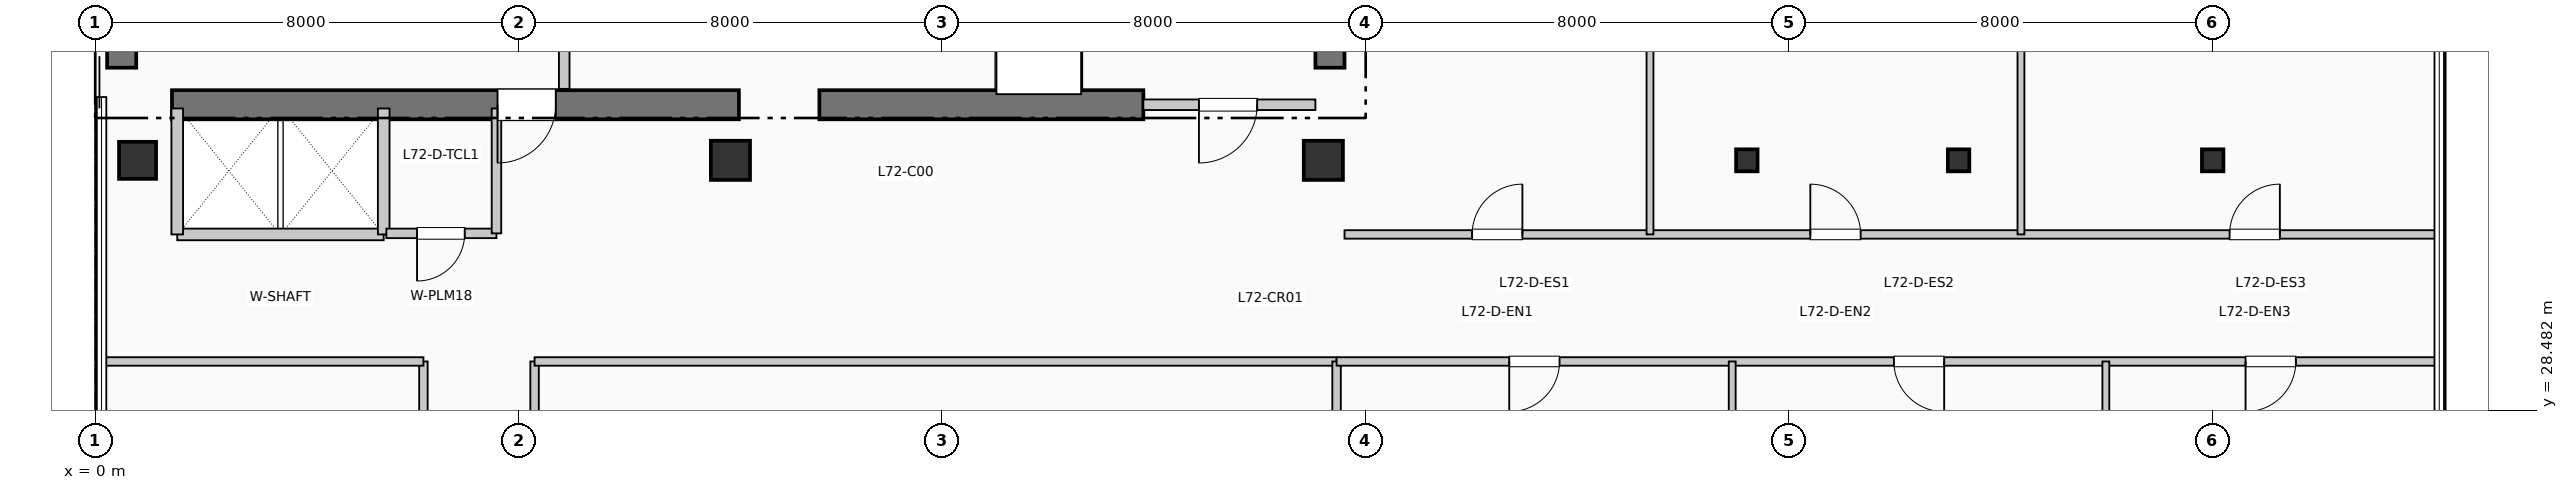
"""IFC4 building model, lengths in metres.
Left out: names, types, materials, properties, quantities, classifications, styles, units other than length and angle.
Written with IfcOpenShell. Run it as: python <this file> out.ifc"""

import sys

from ifc_helpers import new_model, si_unit, direction, frame, frame_2d, origin, origin_2d, place, context, subcontext, project, spatial, rectangle, i_section, extrude, element, fill, save


model = new_model("IFC4")
c1 = context("Model", 3, precision=1e-05, world=origin(), true_north=direction((0.0, 1.0)))
c2 = subcontext(c1, "Body", "Model", "MODEL_VIEW")
j1 = project(units=[si_unit("LENGTHUNIT", "METRE"), si_unit("PLANEANGLEUNIT", "RADIAN")], contexts=[c1])
p1 = place(None, origin())
s1 = spatial("IfcSite", under=j1, at=p1, CompositionType="ELEMENT")
p2 = place(p1, origin())
s2 = spatial("IfcBuilding", under=s1, at=p2, CompositionType="ELEMENT")
p3 = place(p2, frame((0.0, 0.0, 296.01)))
s3 = spatial("IfcBuildingStorey", under=s2, at=p3, CompositionType="ELEMENT", Elevation=296.01)
p4 = place(p3, frame((0.5, 34.95, 0.0), z_axis=(0.0, 0.0, 1.0), x_axis=(0.0, 1.0, 0.0)))
e1 = element("IfcWall", 1, at=p4, inside=s3, PredefinedType="SHEAR", context=c2, shape_type="SweptSolid", body=[
    extrude(rectangle(XDim=7.9, YDim=0.55, at=frame_2d((3.95, 0.0))), origin(), (0.0, 0.0, 1.0), 3.96),
])
p5 = place(p3, frame((23.325, 34.95, 0.0), z_axis=(0.0, 0.0, 1.0), x_axis=(0.0, 1.0, 0.0)))
e2 = element("IfcWall", 2, at=p5, inside=s3, PredefinedType="SHEAR", context=c2, shape_type="SweptSolid", body=[
    extrude(rectangle(XDim=10.64, YDim=0.55, at=frame_2d((5.32, 0.0))), origin(), (0.0, 0.0, 1.0), 3.96),
])
p6 = place(p3, frame((1.45, 34.25, 0.0), z_axis=(0.0, 0.0, 1.0), x_axis=(1.0, 0.0, 0.0)))
e3 = element("IfcWall", 3, at=p6, inside=s3, PredefinedType="SHEAR", context=c2, shape_type="SweptSolid", body=[
    extrude(rectangle(XDim=10.71, YDim=0.55, at=frame_2d((5.355, 0.0))), origin(), (0.0, 0.0, 1.0), 3.96),
])
p7 = place(p6, frame((7.25, 0.0, 0.0), z_axis=(0.0, 0.0, 1.0), x_axis=(-1.0, 0.0, 0.0)))
e4 = element("IfcOpeningElement", 4, at=p7, cuts=e3, PredefinedType="OPENING", context=c2, shape_type="SweptSolid", body=[
    extrude(rectangle(XDim=1.1, YDim=2.15, at=frame_2d((0.55, 1.075))), frame((0.0, 0.285, 0.0), z_axis=(0.0, -1.0, 0.0), x_axis=(1.0, 0.0, 0.0)), (0.0, 0.0, 1.0), 0.57),
])
p8 = place(p3, frame((13.68, 34.25, 0.0), z_axis=(0.0, 0.0, 1.0), x_axis=(1.0, 0.0, 0.0)))
e5 = element("IfcWall", 5, at=p8, inside=s3, PredefinedType="SHEAR", context=c2, shape_type="SweptSolid", body=[
    extrude(rectangle(XDim=6.12, YDim=0.55, at=frame_2d((3.06, 0.0))), origin(), (0.0, 0.0, 1.0), 3.96),
])
p9 = place(p3, frame((0.8, 33.2, 0.0), z_axis=(0.0, 0.0, 1.0), x_axis=(1.0, 0.0, 0.0)))
e6 = element("IfcColumn", 6, at=p9, inside=s3, PredefinedType="COLUMN", context=c2, shape_type="SweptSolid", body=[
    extrude(rectangle(XDim=0.7, YDim=0.7, at=origin_2d()), origin(), (0.0, 0.0, 1.0), 3.96),
])
for number, where, z_axis, x_axis in (
    (7, (12.0, 33.2, 0.0), (0.0, 0.0, 1.0), (1.0, 0.0, 0.0)),
    (8, (23.2, 33.2, 0.0), (0.0, 0.0, 1.0), (1.0, 0.0, 0.0)),
):
    element("IfcColumn", number, at=place(p3, frame(where, z_axis=z_axis, x_axis=x_axis)), inside=s3, PredefinedType="COLUMN", context=c2, shape_type="SweptSolid", body=[
        extrude(rectangle(XDim=0.74, YDim=0.74, at=origin_2d()), origin(), (0.0, 0.0, 1.0), 3.96),
    ])
for number, where, z_axis, x_axis in (
    (9, (31.2, 33.2, 0.0), (0.0, 0.0, 1.0), (1.0, 0.0, 0.0)),
    (10, (35.2, 33.2, 0.0), (0.0, 0.0, 1.0), (1.0, 0.0, 0.0)),
    (11, (40.0, 33.2, 0.0), (0.0, 0.0, 1.0), (1.0, 0.0, 0.0)),
):
    element("IfcColumn", number, at=place(p3, frame(where, z_axis=z_axis, x_axis=x_axis)), inside=s3, PredefinedType="COLUMN", context=c2, shape_type="SweptSolid", body=[
        extrude(i_section(OverallWidth=0.406, OverallDepth=0.416, WebThickness=0.022, FlangeThickness=0.036, at=origin_2d()), origin(), (0.0, 0.0, 1.0), 3.96),
    ])
p10 = place(p3, frame((8.86, 34.55, 0.0), z_axis=(0.0, 0.0, 1.0), x_axis=(0.0, 1.0, 0.0)))
e12 = element("IfcWall", 12, at=p10, inside=s3, PredefinedType="PARTITIONING", context=c2, shape_type="SweptSolid", body=[
    extrude(rectangle(XDim=2.5, YDim=0.2, at=frame_2d((1.25, 0.0))), origin(), (0.0, 0.0, 1.0), 3.74),
])
p11 = place(p3, frame((19.8, 34.25, 0.0), z_axis=(0.0, 0.0, 1.0), x_axis=(1.0, 0.0, 0.0)))
e13 = element("IfcWall", 13, at=p11, inside=s3, PredefinedType="PARTITIONING", context=c2, shape_type="SweptSolid", body=[
    extrude(rectangle(XDim=3.25, YDim=0.2, at=frame_2d((1.625, 0.0))), origin(), (0.0, 0.0, 1.0), 3.74),
])
p12 = place(p11, frame((2.15, 0.0, 0.0), z_axis=(0.0, 0.0, 1.0), x_axis=(-1.0, 0.0, 0.0)))
e14 = element("IfcOpeningElement", 14, at=p12, cuts=e13, PredefinedType="OPENING", context=c2, shape_type="SweptSolid", body=[
    extrude(rectangle(XDim=1.1, YDim=2.15, at=frame_2d((0.55, 1.075))), frame((0.0, 0.11, 0.0), z_axis=(0.0, -1.0, 0.0), x_axis=(1.0, 0.0, 0.0)), (0.0, 0.0, 1.0), 0.22),
])
p13 = place(p3, frame((1.55, 31.8, 0.0), z_axis=(0.0, 0.0, 1.0), x_axis=(1.0, 0.0, 0.0)))
e15 = element("IfcWall", 15, at=p13, inside=s3, PredefinedType="PARTITIONING", context=c2, shape_type="SweptSolid", body=[
    extrude(rectangle(XDim=3.9, YDim=0.22, at=frame_2d((1.95, 0.0))), origin(), (0.0, 0.0, 1.0), 3.74),
])
for number, where, z_axis, x_axis in (
    (16, (1.55, 31.8, 0.0), (0.0, 0.0, 1.0), (0.0, 1.0, 0.0)),
    (17, (5.45, 31.8, 0.0), (0.0, 0.0, 1.0), (0.0, 1.0, 0.0)),
):
    element("IfcWall", number, at=place(p3, frame(where, z_axis=z_axis, x_axis=x_axis)), inside=s3, PredefinedType="PARTITIONING", context=c2, shape_type="SweptSolid", body=[
        extrude(rectangle(XDim=2.38, YDim=0.22, at=frame_2d((1.19, 0.0))), origin(), (0.0, 0.0, 1.0), 3.74),
    ])
p14 = place(p3, frame((5.5, 31.82, 0.0), z_axis=(0.0, 0.0, 1.0), x_axis=(1.0, 0.0, 0.0)))
e18 = element("IfcWall", 18, at=p14, inside=s3, PredefinedType="PLUMBINGWALL", context=c2, shape_type="SweptSolid", body=[
    extrude(rectangle(XDim=2.08, YDim=0.18, at=frame_2d((1.04, 0.0))), origin(), (0.0, 0.0, 1.0), 3.74),
])
p15 = place(p14, frame((1.48, 0.0, 0.0), z_axis=(0.0, 0.0, 1.0), x_axis=(-1.0, 0.0, 0.0)))
e19 = element("IfcOpeningElement", 19, at=p15, cuts=e18, PredefinedType="OPENING", context=c2, shape_type="SweptSolid", body=[
    extrude(rectangle(XDim=0.9, YDim=2.1, at=frame_2d((0.45, 1.05))), frame((0.0, 0.1, 0.0), z_axis=(0.0, -1.0, 0.0), x_axis=(1.0, 0.0, 0.0)), (0.0, 0.0, 1.0), 0.2),
])
p16 = place(p3, frame((7.58, 31.82, 0.0), z_axis=(0.0, 0.0, 1.0), x_axis=(0.0, 1.0, 0.0)))
e20 = element("IfcWall", 20, at=p16, inside=s3, PredefinedType="PLUMBINGWALL", context=c2, shape_type="SweptSolid", body=[
    extrude(rectangle(XDim=2.36, YDim=0.18, at=frame_2d((1.18, 0.0))), origin(), (0.0, 0.0, 1.0), 3.74),
])
p17 = place(p3, frame((6.2, 11.04, 0.0), z_axis=(0.0, 0.0, 1.0), x_axis=(0.0, 1.0, 0.0)))
e21 = element("IfcWall", 21, at=p17, inside=s3, PredefinedType="PARTITIONING", context=c2, shape_type="SweptSolid", body=[
    extrude(rectangle(XDim=18.36, YDim=0.16, at=frame_2d((9.18, 0.0))), origin(), (0.0, 0.0, 1.0), 3.74),
])
p18 = place(p17, frame((3.413, 0.0, 0.0), z_axis=(0.0, 0.0, 1.0), x_axis=(-1.0, 0.0, 0.0)))
e22 = element("IfcOpeningElement", 22, at=p18, cuts=e21, PredefinedType="OPENING", context=c2, shape_type="SweptSolid", body=[
    extrude(rectangle(XDim=0.95, YDim=2.15, at=frame_2d((0.475, 1.075))), frame((0.0, 0.09, 0.0), z_axis=(0.0, -1.0, 0.0), x_axis=(1.0, 0.0, 0.0)), (0.0, 0.0, 1.0), 0.18),
])
p19 = place(p17, frame((9.38, 0.0, 0.0), z_axis=(0.0, 0.0, 1.0), x_axis=(-1.0, 0.0, 0.0)))
e23 = element("IfcOpeningElement", 23, at=p19, cuts=e21, PredefinedType="OPENING", context=c2, shape_type="SweptSolid", body=[
    extrude(rectangle(XDim=0.95, YDim=2.15, at=frame_2d((0.475, 1.075))), frame((0.0, 0.09, 0.0), z_axis=(0.0, -1.0, 0.0), x_axis=(1.0, 0.0, 0.0)), (0.0, 0.0, 1.0), 0.18),
])
p20 = place(p17, frame((15.622, 0.0, 0.0), z_axis=(0.0, 0.0, 1.0), x_axis=(-1.0, 0.0, 0.0)))
e24 = element("IfcOpeningElement", 24, at=p20, cuts=e21, PredefinedType="OPENING", context=c2, shape_type="SweptSolid", body=[
    extrude(rectangle(XDim=0.95, YDim=2.15, at=frame_2d((0.475, 1.075))), frame((0.0, 0.09, 0.0), z_axis=(0.0, -1.0, 0.0), x_axis=(1.0, 0.0, 0.0)), (0.0, 0.0, 1.0), 0.18),
])
p21 = place(p3, frame((8.3, 11.04, 0.0), z_axis=(0.0, 0.0, 1.0), x_axis=(0.0, 1.0, 0.0)))
e25 = element("IfcWall", 25, at=p21, inside=s3, PredefinedType="PARTITIONING", context=c2, shape_type="SweptSolid", body=[
    extrude(rectangle(XDim=18.36, YDim=0.16, at=frame_2d((9.18, 0.0))), origin(), (0.0, 0.0, 1.0), 3.74),
])
p22 = place(p21, frame((1.545, 0.0, 0.0)))
e26 = element("IfcOpeningElement", 26, at=p22, cuts=e25, PredefinedType="OPENING", context=c2, shape_type="SweptSolid", body=[
    extrude(rectangle(XDim=0.95, YDim=2.15, at=frame_2d((0.475, 1.075))), frame((0.0, 0.09, 0.0), z_axis=(0.0, -1.0, 0.0), x_axis=(1.0, 0.0, 0.0)), (0.0, 0.0, 1.0), 0.18),
])
p23 = place(p21, frame((5.951, 0.0, 0.0)))
e27 = element("IfcOpeningElement", 27, at=p23, cuts=e25, PredefinedType="OPENING", context=c2, shape_type="SweptSolid", body=[
    extrude(rectangle(XDim=0.95, YDim=2.15, at=frame_2d((0.475, 1.075))), frame((0.0, 0.09, 0.0), z_axis=(0.0, -1.0, 0.0), x_axis=(1.0, 0.0, 0.0)), (0.0, 0.0, 1.0), 0.18),
])
p24 = place(p21, frame((10.908, 0.0, 0.0)))
e28 = element("IfcOpeningElement", 28, at=p24, cuts=e25, PredefinedType="OPENING", context=c2, shape_type="SweptSolid", body=[
    extrude(rectangle(XDim=0.95, YDim=2.15, at=frame_2d((0.475, 1.075))), frame((0.0, 0.09, 0.0), z_axis=(0.0, -1.0, 0.0), x_axis=(1.0, 0.0, 0.0)), (0.0, 0.0, 1.0), 0.18),
])
p25 = place(p21, frame((15.682, 0.0, 0.0)))
e29 = element("IfcOpeningElement", 29, at=p25, cuts=e25, PredefinedType="OPENING", context=c2, shape_type="SweptSolid", body=[
    extrude(rectangle(XDim=0.95, YDim=2.15, at=frame_2d((0.475, 1.075))), frame((0.0, 0.09, 0.0), z_axis=(0.0, -1.0, 0.0), x_axis=(1.0, 0.0, 0.0)), (0.0, 0.0, 1.0), 0.18),
])
p26 = place(p3, frame((0.19, 29.4, 0.0), z_axis=(0.0, 0.0, 1.0), x_axis=(1.0, 0.0, 0.0)))
e30 = element("IfcWall", 30, at=p26, inside=s3, PredefinedType="PARTITIONING", context=c2, shape_type="SweptSolid", body=[
    extrude(rectangle(XDim=6.01, YDim=0.16, at=frame_2d((3.005, 0.0))), origin(), (0.0, 0.0, 1.0), 3.425),
])
p27 = place(p3, frame((8.3, 29.4, 0.0), z_axis=(0.0, 0.0, 1.0), x_axis=(1.0, 0.0, 0.0)))
e31 = element("IfcWall", 31, at=p27, inside=s3, PredefinedType="PARTITIONING", context=c2, shape_type="SweptSolid", body=[
    extrude(rectangle(XDim=15.15, YDim=0.16, at=frame_2d((7.575, 0.0))), origin(), (0.0, 0.0, 1.0), 3.425),
])
p28 = place(p3, frame((23.45, 6.84, 0.0), z_axis=(0.0, 0.0, 1.0), x_axis=(0.0, 1.0, 0.0)))
e32 = element("IfcWall", 32, at=p28, inside=s3, PredefinedType="PARTITIONING", context=c2, shape_type="SweptSolid", body=[
    extrude(rectangle(XDim=22.56, YDim=0.16, at=frame_2d((11.28, 0.0))), origin(), (0.0, 0.0, 1.0), 3.175),
])
p29 = place(p3, frame((23.45, 29.4, 0.0), z_axis=(0.0, 0.0, 1.0), x_axis=(1.0, 0.0, 0.0)))
e33 = element("IfcWall", 33, at=p29, inside=s3, PredefinedType="PARTITIONING", context=c2, shape_type="SweptSolid", body=[
    extrude(rectangle(XDim=20.76, YDim=0.16, at=frame_2d((10.38, 0.0))), origin(), (0.0, 0.0, 1.0), 3.425),
])
p30 = place(p29, frame((4.212, 0.0, 0.0), z_axis=(0.0, 0.0, 1.0), x_axis=(-1.0, 0.0, 0.0)))
e34 = element("IfcOpeningElement", 34, at=p30, cuts=e33, PredefinedType="OPENING", context=c2, shape_type="SweptSolid", body=[
    extrude(rectangle(XDim=0.95, YDim=2.15, at=frame_2d((0.475, 1.075))), frame((0.0, 0.09, 0.0), z_axis=(0.0, -1.0, 0.0), x_axis=(1.0, 0.0, 0.0)), (0.0, 0.0, 1.0), 0.18),
])
p31 = place(p29, frame((11.478, 0.0, 0.0), z_axis=(0.0, 0.0, 1.0), x_axis=(-1.0, 0.0, 0.0)))
e35 = element("IfcOpeningElement", 35, at=p31, cuts=e33, PredefinedType="OPENING", context=c2, shape_type="SweptSolid", body=[
    extrude(rectangle(XDim=0.95, YDim=2.15, at=frame_2d((0.475, 1.075))), frame((0.0, 0.09, 0.0), z_axis=(0.0, -1.0, 0.0), x_axis=(1.0, 0.0, 0.0)), (0.0, 0.0, 1.0), 0.18),
])
p32 = place(p29, frame((18.121, 0.0, 0.0), z_axis=(0.0, 0.0, 1.0), x_axis=(-1.0, 0.0, 0.0)))
e36 = element("IfcOpeningElement", 36, at=p32, cuts=e33, PredefinedType="OPENING", context=c2, shape_type="SweptSolid", body=[
    extrude(rectangle(XDim=0.95, YDim=2.15, at=frame_2d((0.475, 1.075))), frame((0.0, 0.09, 0.0), z_axis=(0.0, -1.0, 0.0), x_axis=(1.0, 0.0, 0.0)), (0.0, 0.0, 1.0), 0.18),
])
p33 = place(p3, frame((23.6, 31.8, 0.0), z_axis=(0.0, 0.0, 1.0), x_axis=(1.0, 0.0, 0.0)))
e37 = element("IfcWall", 37, at=p33, inside=s3, PredefinedType="PARTITIONING", context=c2, shape_type="SweptSolid", body=[
    extrude(rectangle(XDim=20.61, YDim=0.16, at=frame_2d((10.305, 0.0))), origin(), (0.0, 0.0, 1.0), 3.74),
])
p34 = place(p33, frame((2.41, 0.0, 0.0)))
e38 = element("IfcOpeningElement", 38, at=p34, cuts=e37, PredefinedType="OPENING", context=c2, shape_type="SweptSolid", body=[
    extrude(rectangle(XDim=0.95, YDim=2.15, at=frame_2d((0.475, 1.075))), frame((0.0, 0.09, 0.0), z_axis=(0.0, -1.0, 0.0), x_axis=(1.0, 0.0, 0.0)), (0.0, 0.0, 1.0), 0.18),
])
p35 = place(p33, frame((8.8, 0.0, 0.0)))
e39 = element("IfcOpeningElement", 39, at=p35, cuts=e37, PredefinedType="OPENING", context=c2, shape_type="SweptSolid", body=[
    extrude(rectangle(XDim=0.95, YDim=2.15, at=frame_2d((0.475, 1.075))), frame((0.0, 0.09, 0.0), z_axis=(0.0, -1.0, 0.0), x_axis=(1.0, 0.0, 0.0)), (0.0, 0.0, 1.0), 0.18),
])
p36 = place(p33, frame((16.719, 0.0, 0.0)))
e40 = element("IfcOpeningElement", 40, at=p36, cuts=e37, PredefinedType="OPENING", context=c2, shape_type="SweptSolid", body=[
    extrude(rectangle(XDim=0.95, YDim=2.15, at=frame_2d((0.475, 1.075))), frame((0.0, 0.09, 0.0), z_axis=(0.0, -1.0, 0.0), x_axis=(1.0, 0.0, 0.0)), (0.0, 0.0, 1.0), 0.18),
])
p37 = place(p3, frame((30.924, 25.19, 0.0), z_axis=(0.0, 0.0, 1.0), x_axis=(0.0, 1.0, 0.0)))
e41 = element("IfcWall", 41, at=p37, inside=s3, PredefinedType="PARTITIONING", context=c2, shape_type="SweptSolid", body=[
    extrude(rectangle(XDim=4.21, YDim=0.13, at=frame_2d((2.105, 0.0))), origin(), (0.0, 0.0, 1.0), 3.175),
])
p38 = place(p3, frame((37.982, 25.19, 0.0), z_axis=(0.0, 0.0, 1.0), x_axis=(0.0, 1.0, 0.0)))
e42 = element("IfcWall", 42, at=p38, inside=s3, PredefinedType="PARTITIONING", context=c2, shape_type="SweptSolid", body=[
    extrude(rectangle(XDim=4.21, YDim=0.13, at=frame_2d((2.105, 0.0))), origin(), (0.0, 0.0, 1.0), 3.74),
])
for number, where, z_axis, x_axis in (
    (43, (29.371, 31.8, 0.0), (0.0, 0.0, 1.0), (0.0, 1.0, 0.0)),
    (44, (36.378, 31.8, 0.0), (0.0, 0.0, 1.0), (0.0, 1.0, 0.0)),
):
    element("IfcWall", number, at=place(p3, frame(where, z_axis=z_axis, x_axis=x_axis)), inside=s3, PredefinedType="PARTITIONING", context=c2, shape_type="SweptSolid", body=[
        extrude(rectangle(XDim=14.01, YDim=0.13, at=frame_2d((7.005, 0.0))), origin(), (0.0, 0.0, 1.0), 3.74),
    ])
p39 = place(p7, origin())
e45 = element("IfcDoor", 45, at=p39, inside=s3, OperationType="SINGLE_SWING_LEFT", PredefinedType="DOOR", context=c2, shape_type="SweptSolid", body=[
    extrude(rectangle(XDim=1.1, YDim=2.15, at=frame_2d((0.55, 1.075))), frame((0.0, 0.025, 0.0), z_axis=(0.0, -1.0, 0.0), x_axis=(1.0, 0.0, 0.0)), (0.0, 0.0, 1.0), 0.05),
])
fill(e4, e45)
p40 = place(p12, origin())
e46 = element("IfcDoor", 46, at=p40, inside=s3, OperationType="SINGLE_SWING_LEFT", PredefinedType="DOOR", context=c2, shape_type="SweptSolid", body=[
    extrude(rectangle(XDim=1.1, YDim=2.15, at=frame_2d((0.55, 1.075))), frame((0.0, 0.025, 0.0), z_axis=(0.0, -1.0, 0.0), x_axis=(1.0, 0.0, 0.0)), (0.0, 0.0, 1.0), 0.05),
])
fill(e14, e46)
p41 = place(p15, origin())
e47 = element("IfcDoor", 47, at=p41, inside=s3, OperationType="SINGLE_SWING_LEFT", PredefinedType="DOOR", context=c2, shape_type="SweptSolid", body=[
    extrude(rectangle(XDim=0.9, YDim=2.1, at=frame_2d((0.45, 1.05))), frame((0.0, 0.025, 0.0), z_axis=(0.0, -1.0, 0.0), x_axis=(1.0, 0.0, 0.0)), (0.0, 0.0, 1.0), 0.05),
])
fill(e19, e47)
p42 = place(p30, origin())
e48 = element("IfcDoor", 48, at=p42, inside=s3, OperationType="SINGLE_SWING_LEFT", PredefinedType="DOOR", context=c2, shape_type="SweptSolid", body=[
    extrude(rectangle(XDim=0.95, YDim=2.15, at=frame_2d((0.475, 1.075))), frame((0.0, 0.025, 0.0), z_axis=(0.0, -1.0, 0.0), x_axis=(1.0, 0.0, 0.0)), (0.0, 0.0, 1.0), 0.05),
])
fill(e34, e48)
p43 = place(p31, origin())
e49 = element("IfcDoor", 49, at=p43, inside=s3, OperationType="SINGLE_SWING_RIGHT", PredefinedType="DOOR", context=c2, shape_type="SweptSolid", body=[
    extrude(rectangle(XDim=0.95, YDim=2.15, at=frame_2d((0.475, 1.075))), frame((0.0, 0.025, 0.0), z_axis=(0.0, -1.0, 0.0), x_axis=(1.0, 0.0, 0.0)), (0.0, 0.0, 1.0), 0.05),
])
fill(e35, e49)
p44 = place(p32, origin())
e50 = element("IfcDoor", 50, at=p44, inside=s3, OperationType="SINGLE_SWING_LEFT", PredefinedType="DOOR", context=c2, shape_type="SweptSolid", body=[
    extrude(rectangle(XDim=0.95, YDim=2.15, at=frame_2d((0.475, 1.075))), frame((0.0, 0.025, 0.0), z_axis=(0.0, -1.0, 0.0), x_axis=(1.0, 0.0, 0.0)), (0.0, 0.0, 1.0), 0.05),
])
fill(e36, e50)
p45 = place(p34, origin())
e51 = element("IfcDoor", 51, at=p45, inside=s3, OperationType="SINGLE_SWING_RIGHT", PredefinedType="DOOR", context=c2, shape_type="SweptSolid", body=[
    extrude(rectangle(XDim=0.95, YDim=2.15, at=frame_2d((0.475, 1.075))), frame((0.0, 0.025, 0.0), z_axis=(0.0, -1.0, 0.0), x_axis=(1.0, 0.0, 0.0)), (0.0, 0.0, 1.0), 0.05),
])
fill(e38, e51)
p46 = place(p35, origin())
e52 = element("IfcDoor", 52, at=p46, inside=s3, OperationType="SINGLE_SWING_LEFT", PredefinedType="DOOR", context=c2, shape_type="SweptSolid", body=[
    extrude(rectangle(XDim=0.95, YDim=2.15, at=frame_2d((0.475, 1.075))), frame((0.0, 0.025, 0.0), z_axis=(0.0, -1.0, 0.0), x_axis=(1.0, 0.0, 0.0)), (0.0, 0.0, 1.0), 0.05),
])
fill(e39, e52)
p47 = place(p36, origin())
e53 = element("IfcDoor", 53, at=p47, inside=s3, OperationType="SINGLE_SWING_RIGHT", PredefinedType="DOOR", context=c2, shape_type="SweptSolid", body=[
    extrude(rectangle(XDim=0.95, YDim=2.15, at=frame_2d((0.475, 1.075))), frame((0.0, 0.025, 0.0), z_axis=(0.0, -1.0, 0.0), x_axis=(1.0, 0.0, 0.0)), (0.0, 0.0, 1.0), 0.05),
])
fill(e40, e53)
save(model, sys.argv[1])
